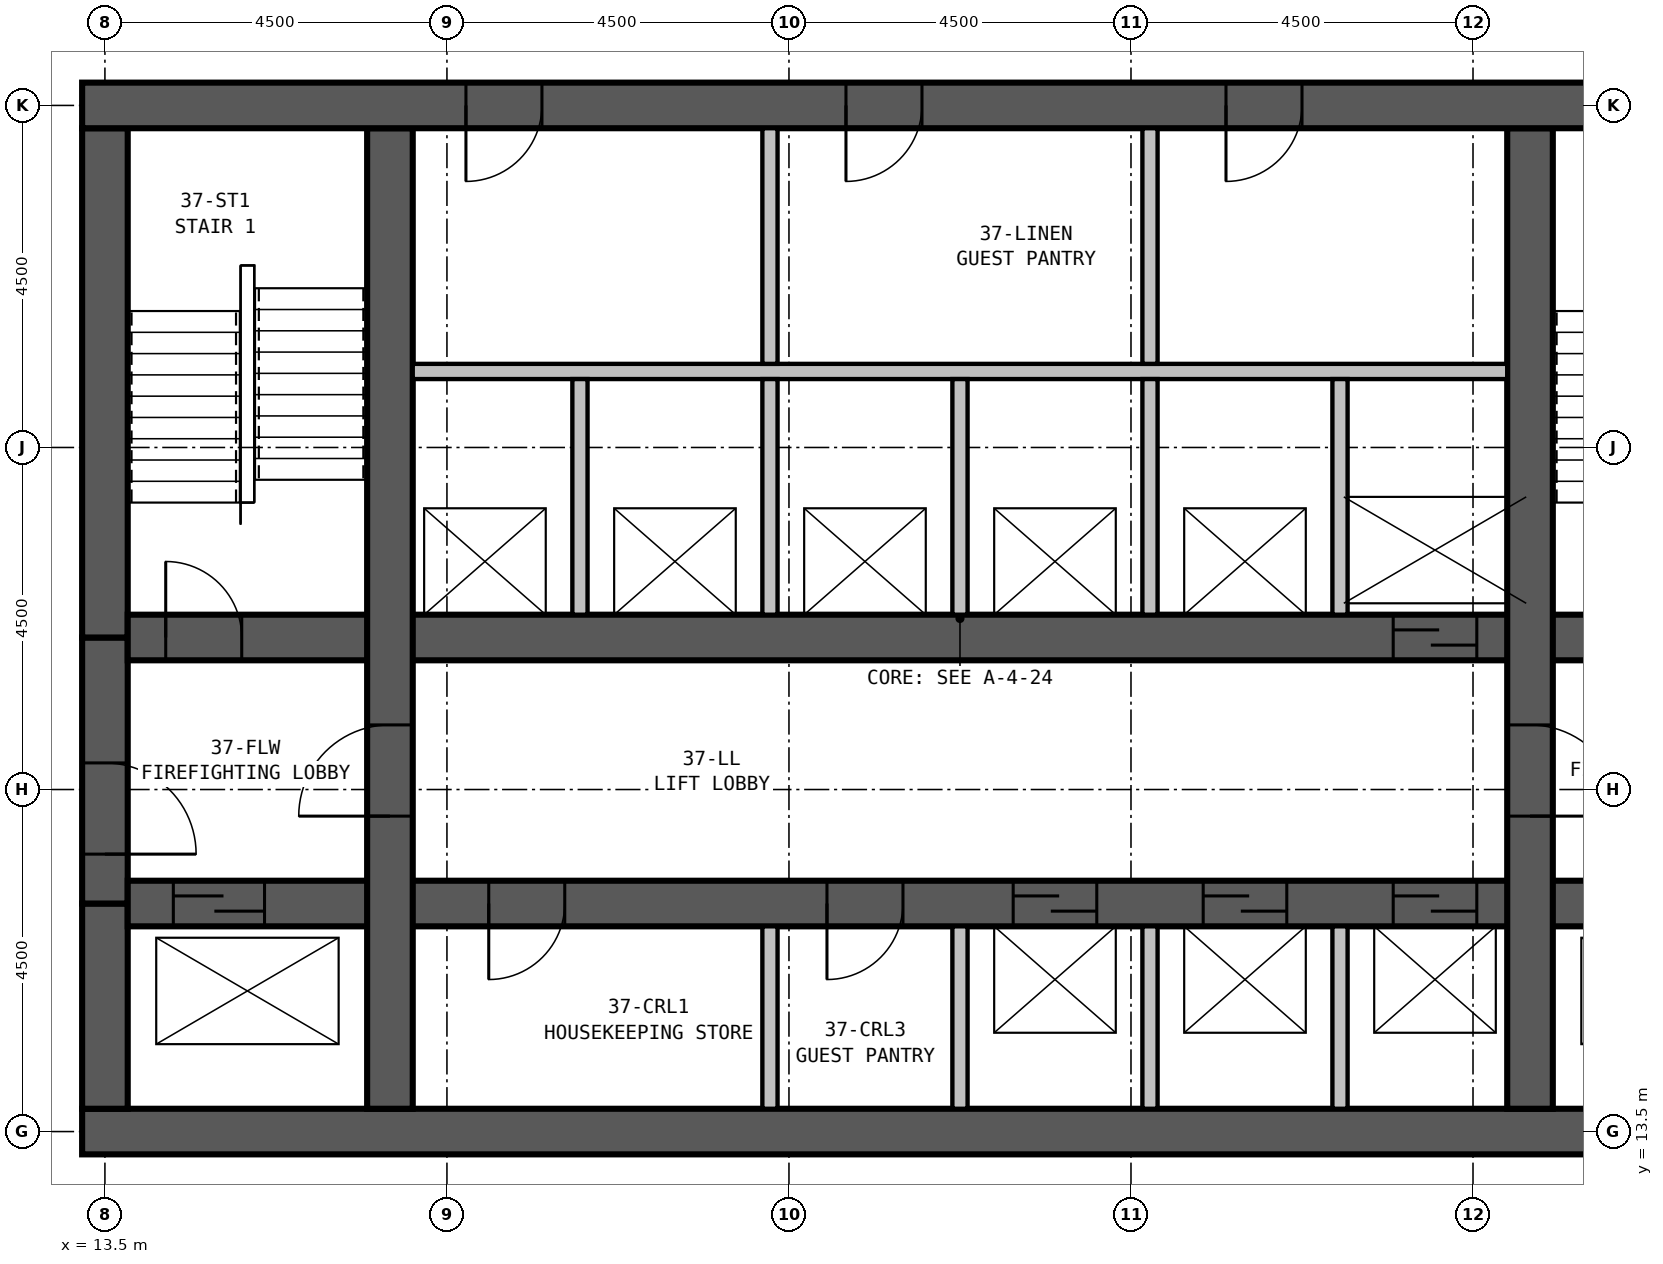
"""IFC4 building model, lengths in metres.
Left out: names, types, materials, properties, quantities, classifications, styles, units other than length and angle.
Written with IfcOpenShell. Run it as: python <this file> out.ifc"""

import sys

from ifc_helpers import new_model, si_unit, direction, frame, frame_2d, origin, place, context, subcontext, project, spatial, rectangle, extrude, element, fill, save


model = new_model("IFC4")
c1 = context("Model", 3, precision=1e-05, world=origin(), true_north=direction((0.0, 1.0)))
c2 = subcontext(c1, "Body", "Model", "MODEL_VIEW")
j1 = project(units=[si_unit("LENGTHUNIT", "METRE"), si_unit("PLANEANGLEUNIT", "RADIAN")], contexts=[c1])
p1 = place(None, origin())
s1 = spatial("IfcSite", under=j1, at=p1, CompositionType="ELEMENT")
p2 = place(p1, origin())
s2 = spatial("IfcBuilding", under=s1, at=p2, CompositionType="ELEMENT")
p3 = place(p2, frame((0.0, 0.0, 142.4)))
s3 = spatial("IfcBuildingStorey", under=s2, at=p3, CompositionType="ELEMENT", Elevation=142.4)
p4 = place(p3, frame((13.2, 13.5, 0.0), z_axis=(0.0, 0.0, 1.0), x_axis=(1.0, 0.0, 0.0)))
e1 = element("IfcWall", 1, at=p4, inside=s3, PredefinedType="SHEAR", context=c2, shape_type="SweptSolid", body=[
    extrude(rectangle(XDim=23.1, YDim=0.6, at=frame_2d((11.55, 0.0))), origin(), (0.0, 0.0, 1.0), 3.5),
])
p5 = place(p3, frame((36.3, 27.0, 0.0), z_axis=(0.0, 0.0, 1.0), x_axis=(-1.0, 0.0, 0.0)))
e2 = element("IfcWall", 2, at=p5, inside=s3, PredefinedType="SHEAR", context=c2, shape_type="SweptSolid", body=[
    extrude(rectangle(XDim=23.1, YDim=0.6, at=frame_2d((11.55, 0.0))), origin(), (0.0, 0.0, 1.0), 3.5),
])
p6 = place(p5, frame((17.05, 0.0, 0.0)))
e3 = element("IfcOpeningElement", 3, at=p6, cuts=e2, PredefinedType="OPENING", context=c2, shape_type="SweptSolid", body=[
    extrude(rectangle(XDim=1.0, YDim=2.1, at=frame_2d((0.5, 1.05))), frame((0.0, 0.31, 0.0), z_axis=(0.0, -1.0, 0.0), x_axis=(1.0, 0.0, 0.0)), (0.0, 0.0, 1.0), 0.62),
])
p7 = place(p5, frame((12.05, 0.0, 0.0)))
e4 = element("IfcOpeningElement", 4, at=p7, cuts=e2, PredefinedType="OPENING", context=c2, shape_type="SweptSolid", body=[
    extrude(rectangle(XDim=1.0, YDim=2.1, at=frame_2d((0.5, 1.05))), frame((0.0, 0.31, 0.0), z_axis=(0.0, -1.0, 0.0), x_axis=(1.0, 0.0, 0.0)), (0.0, 0.0, 1.0), 0.62),
])
p8 = place(p5, frame((7.05, 0.0, 0.0)))
e5 = element("IfcOpeningElement", 5, at=p8, cuts=e2, PredefinedType="OPENING", context=c2, shape_type="SweptSolid", body=[
    extrude(rectangle(XDim=1.0, YDim=2.1, at=frame_2d((0.5, 1.05))), frame((0.0, 0.31, 0.0), z_axis=(0.0, -1.0, 0.0), x_axis=(1.0, 0.0, 0.0)), (0.0, 0.0, 1.0), 0.62),
])
p9 = place(p3, frame((17.25, 13.8, 0.0), z_axis=(0.0, 0.0, 1.0), x_axis=(0.0, 1.0, 0.0)))
e6 = element("IfcWall", 6, at=p9, inside=s3, PredefinedType="SHEAR", context=c2, shape_type="SweptSolid", body=[
    extrude(rectangle(XDim=12.9, YDim=0.6, at=frame_2d((6.45, 0.0))), origin(), (0.0, 0.0, 1.0), 3.5),
])
p10 = place(p9, frame((3.85, 0.0, 0.0)))
e7 = element("IfcOpeningElement", 7, at=p10, cuts=e6, PredefinedType="OPENING", context=c2, shape_type="SweptSolid", body=[
    extrude(rectangle(XDim=1.2, YDim=2.1, at=frame_2d((0.6, 1.05))), frame((0.0, 0.31, 0.0), z_axis=(0.0, -1.0, 0.0), x_axis=(1.0, 0.0, 0.0)), (0.0, 0.0, 1.0), 0.62),
])
p11 = place(p3, frame((32.25, 13.8, 0.0), z_axis=(0.0, 0.0, 1.0), x_axis=(0.0, 1.0, 0.0)))
e8 = element("IfcWall", 8, at=p11, inside=s3, PredefinedType="SHEAR", context=c2, shape_type="SweptSolid", body=[
    extrude(rectangle(XDim=12.9, YDim=0.6, at=frame_2d((6.45, 0.0))), origin(), (0.0, 0.0, 1.0), 3.5),
])
p12 = place(p11, frame((5.05, 0.0, 0.0), z_axis=(0.0, 0.0, 1.0), x_axis=(-1.0, 0.0, 0.0)))
e9 = element("IfcOpeningElement", 9, at=p12, cuts=e8, PredefinedType="OPENING", context=c2, shape_type="SweptSolid", body=[
    extrude(rectangle(XDim=1.2, YDim=2.1, at=frame_2d((0.6, 1.05))), frame((0.0, 0.31, 0.0), z_axis=(0.0, -1.0, 0.0), x_axis=(1.0, 0.0, 0.0)), (0.0, 0.0, 1.0), 0.62),
])
p13 = place(p3, frame((13.8, 16.5, 0.0), z_axis=(0.0, 0.0, 1.0), x_axis=(1.0, 0.0, 0.0)))
e10 = element("IfcWall", 10, at=p13, inside=s3, PredefinedType="SHEAR", context=c2, shape_type="SweptSolid", body=[
    extrude(rectangle(XDim=21.9, YDim=0.6, at=frame_2d((10.95, 0.0))), origin(), (0.0, 0.0, 1.0), 3.5),
])
p14 = place(p13, frame((11.65, 0.0, 0.0)))
e11 = element("IfcOpeningElement", 11, at=p14, cuts=e10, PredefinedType="OPENING", context=c2, shape_type="SweptSolid", body=[
    extrude(rectangle(XDim=1.1, YDim=2.1, at=frame_2d((0.55, 1.05))), frame((0.0, 0.31, 0.0), z_axis=(0.0, -1.0, 0.0), x_axis=(1.0, 0.0, 0.0)), (0.0, 0.0, 1.0), 0.62),
])
p15 = place(p13, frame((14.15, 0.0, 0.0)))
e12 = element("IfcOpeningElement", 12, at=p15, cuts=e10, PredefinedType="OPENING", context=c2, shape_type="SweptSolid", body=[
    extrude(rectangle(XDim=1.1, YDim=2.1, at=frame_2d((0.55, 1.05))), frame((0.0, 0.31, 0.0), z_axis=(0.0, -1.0, 0.0), x_axis=(1.0, 0.0, 0.0)), (0.0, 0.0, 1.0), 0.62),
])
p16 = place(p13, frame((16.65, 0.0, 0.0)))
e13 = element("IfcOpeningElement", 13, at=p16, cuts=e10, PredefinedType="OPENING", context=c2, shape_type="SweptSolid", body=[
    extrude(rectangle(XDim=1.1, YDim=2.1, at=frame_2d((0.55, 1.05))), frame((0.0, 0.31, 0.0), z_axis=(0.0, -1.0, 0.0), x_axis=(1.0, 0.0, 0.0)), (0.0, 0.0, 1.0), 0.62),
])
p17 = place(p13, frame((5.75, 0.0, 0.0), z_axis=(0.0, 0.0, 1.0), x_axis=(-1.0, 0.0, 0.0)))
e14 = element("IfcOpeningElement", 14, at=p17, cuts=e10, PredefinedType="OPENING", context=c2, shape_type="SweptSolid", body=[
    extrude(rectangle(XDim=1.0, YDim=2.1, at=frame_2d((0.5, 1.05))), frame((0.0, 0.31, 0.0), z_axis=(0.0, -1.0, 0.0), x_axis=(1.0, 0.0, 0.0)), (0.0, 0.0, 1.0), 0.62),
])
p18 = place(p13, frame((10.2, 0.0, 0.0), z_axis=(0.0, 0.0, 1.0), x_axis=(-1.0, 0.0, 0.0)))
e15 = element("IfcOpeningElement", 15, at=p18, cuts=e10, PredefinedType="OPENING", context=c2, shape_type="SweptSolid", body=[
    extrude(rectangle(XDim=1.0, YDim=2.1, at=frame_2d((0.5, 1.05))), frame((0.0, 0.31, 0.0), z_axis=(0.0, -1.0, 0.0), x_axis=(1.0, 0.0, 0.0)), (0.0, 0.0, 1.0), 0.62),
])
p19 = place(p13, frame((0.6, 0.0, 0.0)))
e16 = element("IfcOpeningElement", 16, at=p19, cuts=e10, PredefinedType="OPENING", context=c2, shape_type="SweptSolid", body=[
    extrude(rectangle(XDim=1.2, YDim=2.1, at=frame_2d((0.6, 1.05))), frame((0.0, 0.31, 0.0), z_axis=(0.0, -1.0, 0.0), x_axis=(1.0, 0.0, 0.0)), (0.0, 0.0, 1.0), 0.62),
])
p20 = place(p13, frame((19.6, 0.0, 0.0)))
e17 = element("IfcOpeningElement", 17, at=p20, cuts=e10, PredefinedType="OPENING", context=c2, shape_type="SweptSolid", body=[
    extrude(rectangle(XDim=1.2, YDim=2.1, at=frame_2d((0.6, 1.05))), frame((0.0, 0.31, 0.0), z_axis=(0.0, -1.0, 0.0), x_axis=(1.0, 0.0, 0.0)), (0.0, 0.0, 1.0), 0.62),
])
p21 = place(p3, frame((13.8, 20.0, 0.0), z_axis=(0.0, 0.0, 1.0), x_axis=(1.0, 0.0, 0.0)))
e18 = element("IfcWall", 18, at=p21, inside=s3, PredefinedType="SHEAR", context=c2, shape_type="SweptSolid", body=[
    extrude(rectangle(XDim=21.9, YDim=0.6, at=frame_2d((10.95, 0.0))), origin(), (0.0, 0.0, 1.0), 3.5),
])
p22 = place(p21, frame((0.5, 0.0, 0.0)))
e19 = element("IfcOpeningElement", 19, at=p22, cuts=e18, PredefinedType="OPENING", context=c2, shape_type="SweptSolid", body=[
    extrude(rectangle(XDim=1.0, YDim=2.1, at=frame_2d((0.5, 1.05))), frame((0.0, 0.31, 0.0), z_axis=(0.0, -1.0, 0.0), x_axis=(1.0, 0.0, 0.0)), (0.0, 0.0, 1.0), 0.62),
])
p23 = place(p21, frame((20.5, 0.0, 0.0)))
e20 = element("IfcOpeningElement", 20, at=p23, cuts=e18, PredefinedType="OPENING", context=c2, shape_type="SweptSolid", body=[
    extrude(rectangle(XDim=1.0, YDim=2.1, at=frame_2d((0.5, 1.05))), frame((0.0, 0.31, 0.0), z_axis=(0.0, -1.0, 0.0), x_axis=(1.0, 0.0, 0.0)), (0.0, 0.0, 1.0), 0.62),
])
p24 = place(p21, frame((16.65, 0.0, 0.0)))
e21 = element("IfcOpeningElement", 21, at=p24, cuts=e18, PredefinedType="OPENING", context=c2, shape_type="SweptSolid", body=[
    extrude(rectangle(XDim=1.1, YDim=2.1, at=frame_2d((0.55, 1.05))), frame((0.0, 0.31, 0.0), z_axis=(0.0, -1.0, 0.0), x_axis=(1.0, 0.0, 0.0)), (0.0, 0.0, 1.0), 0.62),
])
p25 = place(p3, frame((13.5, 26.7, 0.0), z_axis=(0.0, 0.0, 1.0), x_axis=(0.0, -1.0, 0.0)))
e22 = element("IfcWall", 22, at=p25, inside=s3, PredefinedType="SHEAR", context=c2, shape_type="SweptSolid", body=[
    extrude(rectangle(XDim=6.7, YDim=0.6, at=frame_2d((3.35, 0.0))), origin(), (0.0, 0.0, 1.0), 3.5),
])
p26 = place(p3, frame((13.5, 20.0, 0.0), z_axis=(0.0, 0.0, 1.0), x_axis=(0.0, -1.0, 0.0)))
e23 = element("IfcWall", 23, at=p26, inside=s3, PredefinedType="SHEAR", context=c2, shape_type="SweptSolid", body=[
    extrude(rectangle(XDim=3.5, YDim=0.6, at=frame_2d((1.75, 0.0))), origin(), (0.0, 0.0, 1.0), 3.5),
])
p27 = place(p26, frame((1.65, 0.0, 0.0)))
e24 = element("IfcOpeningElement", 24, at=p27, cuts=e23, PredefinedType="OPENING", context=c2, shape_type="SweptSolid", body=[
    extrude(rectangle(XDim=1.2, YDim=2.1, at=frame_2d((0.6, 1.05))), frame((0.0, 0.31, 0.0), z_axis=(0.0, -1.0, 0.0), x_axis=(1.0, 0.0, 0.0)), (0.0, 0.0, 1.0), 0.62),
])
p28 = place(p3, frame((13.5, 16.5, 0.0), z_axis=(0.0, 0.0, 1.0), x_axis=(0.0, -1.0, 0.0)))
e25 = element("IfcWall", 25, at=p28, inside=s3, PredefinedType="SHEAR", context=c2, shape_type="SweptSolid", body=[
    extrude(rectangle(XDim=2.7, YDim=0.6, at=frame_2d((1.35, 0.0))), origin(), (0.0, 0.0, 1.0), 3.5),
])
p29 = place(p3, frame((19.75, 20.3, 0.0), z_axis=(0.0, 0.0, 1.0), x_axis=(0.0, 1.0, 0.0)))
e26 = element("IfcWall", 26, at=p29, inside=s3, PredefinedType="PARTITIONING", context=c2, shape_type="SweptSolid", body=[
    extrude(rectangle(XDim=3.1, YDim=0.2, at=frame_2d((1.55, 0.0))), origin(), (0.0, 0.0, 1.0), 3.25),
])
p30 = place(p3, frame((22.25, 13.8, 0.0), z_axis=(0.0, 0.0, 1.0), x_axis=(0.0, 1.0, 0.0)))
e27 = element("IfcWall", 27, at=p30, inside=s3, PredefinedType="PARTITIONING", context=c2, shape_type="SweptSolid", body=[
    extrude(rectangle(XDim=2.4, YDim=0.2, at=frame_2d((1.2, 0.0))), origin(), (0.0, 0.0, 1.0), 3.25),
])
p31 = place(p3, frame((22.25, 20.3, 0.0), z_axis=(0.0, 0.0, 1.0), x_axis=(0.0, 1.0, 0.0)))
e28 = element("IfcWall", 28, at=p31, inside=s3, PredefinedType="PARTITIONING", context=c2, shape_type="SweptSolid", body=[
    extrude(rectangle(XDim=3.1, YDim=0.2, at=frame_2d((1.55, 0.0))), origin(), (0.0, 0.0, 1.0), 3.25),
])
p32 = place(p3, frame((24.75, 13.8, 0.0), z_axis=(0.0, 0.0, 1.0), x_axis=(0.0, 1.0, 0.0)))
e29 = element("IfcWall", 29, at=p32, inside=s3, PredefinedType="PARTITIONING", context=c2, shape_type="SweptSolid", body=[
    extrude(rectangle(XDim=2.4, YDim=0.2, at=frame_2d((1.2, 0.0))), origin(), (0.0, 0.0, 1.0), 3.25),
])
p33 = place(p3, frame((24.75, 20.3, 0.0), z_axis=(0.0, 0.0, 1.0), x_axis=(0.0, 1.0, 0.0)))
e30 = element("IfcWall", 30, at=p33, inside=s3, PredefinedType="PARTITIONING", context=c2, shape_type="SweptSolid", body=[
    extrude(rectangle(XDim=3.1, YDim=0.2, at=frame_2d((1.55, 0.0))), origin(), (0.0, 0.0, 1.0), 3.25),
])
p34 = place(p3, frame((27.25, 13.8, 0.0), z_axis=(0.0, 0.0, 1.0), x_axis=(0.0, 1.0, 0.0)))
e31 = element("IfcWall", 31, at=p34, inside=s3, PredefinedType="PARTITIONING", context=c2, shape_type="SweptSolid", body=[
    extrude(rectangle(XDim=2.4, YDim=0.2, at=frame_2d((1.2, 0.0))), origin(), (0.0, 0.0, 1.0), 3.25),
])
p35 = place(p3, frame((27.25, 20.3, 0.0), z_axis=(0.0, 0.0, 1.0), x_axis=(0.0, 1.0, 0.0)))
e32 = element("IfcWall", 32, at=p35, inside=s3, PredefinedType="PARTITIONING", context=c2, shape_type="SweptSolid", body=[
    extrude(rectangle(XDim=3.1, YDim=0.2, at=frame_2d((1.55, 0.0))), origin(), (0.0, 0.0, 1.0), 3.25),
])
p36 = place(p3, frame((29.75, 13.8, 0.0), z_axis=(0.0, 0.0, 1.0), x_axis=(0.0, 1.0, 0.0)))
e33 = element("IfcWall", 33, at=p36, inside=s3, PredefinedType="PARTITIONING", context=c2, shape_type="SweptSolid", body=[
    extrude(rectangle(XDim=2.4, YDim=0.2, at=frame_2d((1.2, 0.0))), origin(), (0.0, 0.0, 1.0), 3.25),
])
p37 = place(p3, frame((29.75, 20.3, 0.0), z_axis=(0.0, 0.0, 1.0), x_axis=(0.0, 1.0, 0.0)))
e34 = element("IfcWall", 34, at=p37, inside=s3, PredefinedType="PARTITIONING", context=c2, shape_type="SweptSolid", body=[
    extrude(rectangle(XDim=3.1, YDim=0.2, at=frame_2d((1.55, 0.0))), origin(), (0.0, 0.0, 1.0), 3.25),
])
p38 = place(p3, frame((17.55, 23.5, 0.0), z_axis=(0.0, 0.0, 1.0), x_axis=(1.0, 0.0, 0.0)))
e35 = element("IfcWall", 35, at=p38, inside=s3, PredefinedType="PARTITIONING", context=c2, shape_type="SweptSolid", body=[
    extrude(rectangle(XDim=14.4, YDim=0.2, at=frame_2d((7.2, 0.0))), origin(), (0.0, 0.0, 1.0), 3.25),
])
for number, where, z_axis, x_axis in (
    (36, (22.25, 23.6, 0.0), (0.0, 0.0, 1.0), (0.0, 1.0, 0.0)),
    (37, (27.25, 23.6, 0.0), (0.0, 0.0, 1.0), (0.0, 1.0, 0.0)),
):
    element("IfcWall", number, at=place(p3, frame(where, z_axis=z_axis, x_axis=x_axis)), inside=s3, PredefinedType="PARTITIONING", context=c2, shape_type="SweptSolid", body=[
        extrude(rectangle(XDim=3.1, YDim=0.2, at=frame_2d((1.55, 0.0))), origin(), (0.0, 0.0, 1.0), 3.25),
    ])
p39 = place(p27, origin())
e38 = element("IfcDoor", 38, at=p39, inside=s3, OperationType="SINGLE_SWING_RIGHT", PredefinedType="DOOR", context=c2, shape_type="SweptSolid", body=[
    extrude(rectangle(XDim=1.2, YDim=2.1, at=frame_2d((0.6, 1.05))), frame((0.0, 0.3, 0.0), z_axis=(0.0, -1.0, 0.0), x_axis=(1.0, 0.0, 0.0)), (0.0, 0.0, 1.0), 0.6),
])
fill(e24, e38)
p40 = place(p10, origin())
e39 = element("IfcDoor", 39, at=p40, inside=s3, OperationType="SINGLE_SWING_LEFT", PredefinedType="DOOR", context=c2, shape_type="SweptSolid", body=[
    extrude(rectangle(XDim=1.2, YDim=2.1, at=frame_2d((0.6, 1.05))), frame((0.0, 0.3, 0.0), z_axis=(0.0, -1.0, 0.0), x_axis=(1.0, 0.0, 0.0)), (0.0, 0.0, 1.0), 0.6),
])
fill(e7, e39)
p41 = place(p12, origin())
e40 = element("IfcDoor", 40, at=p41, inside=s3, OperationType="SINGLE_SWING_RIGHT", PredefinedType="DOOR", context=c2, shape_type="SweptSolid", body=[
    extrude(rectangle(XDim=1.2, YDim=2.1, at=frame_2d((0.6, 1.05))), frame((0.0, 0.3, 0.0), z_axis=(0.0, -1.0, 0.0), x_axis=(1.0, 0.0, 0.0)), (0.0, 0.0, 1.0), 0.6),
])
fill(e9, e40)
p42 = place(p22, origin())
e41 = element("IfcDoor", 41, at=p42, inside=s3, OperationType="SINGLE_SWING_LEFT", PredefinedType="DOOR", context=c2, shape_type="SweptSolid", body=[
    extrude(rectangle(XDim=1.0, YDim=2.1, at=frame_2d((0.5, 1.05))), frame((0.0, 0.3, 0.0), z_axis=(0.0, -1.0, 0.0), x_axis=(1.0, 0.0, 0.0)), (0.0, 0.0, 1.0), 0.6),
])
fill(e19, e41)
p43 = place(p14, origin())
e42 = element("IfcDoor", 42, at=p43, inside=s3, OperationType="SLIDING_TO_LEFT", PredefinedType="DOOR", context=c2, shape_type="SweptSolid", body=[
    extrude(rectangle(XDim=1.1, YDim=2.1, at=frame_2d((0.55, 1.05))), frame((0.0, 0.3, 0.0), z_axis=(0.0, -1.0, 0.0), x_axis=(1.0, 0.0, 0.0)), (0.0, 0.0, 1.0), 0.6),
])
fill(e11, e42)
p44 = place(p15, origin())
e43 = element("IfcDoor", 43, at=p44, inside=s3, OperationType="SLIDING_TO_LEFT", PredefinedType="DOOR", context=c2, shape_type="SweptSolid", body=[
    extrude(rectangle(XDim=1.1, YDim=2.1, at=frame_2d((0.55, 1.05))), frame((0.0, 0.3, 0.0), z_axis=(0.0, -1.0, 0.0), x_axis=(1.0, 0.0, 0.0)), (0.0, 0.0, 1.0), 0.6),
])
fill(e12, e43)
p45 = place(p16, origin())
e44 = element("IfcDoor", 44, at=p45, inside=s3, OperationType="SLIDING_TO_LEFT", PredefinedType="DOOR", context=c2, shape_type="SweptSolid", body=[
    extrude(rectangle(XDim=1.1, YDim=2.1, at=frame_2d((0.55, 1.05))), frame((0.0, 0.3, 0.0), z_axis=(0.0, -1.0, 0.0), x_axis=(1.0, 0.0, 0.0)), (0.0, 0.0, 1.0), 0.6),
])
fill(e13, e44)
p46 = place(p24, origin())
e45 = element("IfcDoor", 45, at=p46, inside=s3, OperationType="SLIDING_TO_LEFT", PredefinedType="DOOR", context=c2, shape_type="SweptSolid", body=[
    extrude(rectangle(XDim=1.1, YDim=2.1, at=frame_2d((0.55, 1.05))), frame((0.0, 0.3, 0.0), z_axis=(0.0, -1.0, 0.0), x_axis=(1.0, 0.0, 0.0)), (0.0, 0.0, 1.0), 0.6),
])
fill(e21, e45)
p47 = place(p17, origin())
e46 = element("IfcDoor", 46, at=p47, inside=s3, OperationType="SINGLE_SWING_RIGHT", PredefinedType="DOOR", context=c2, shape_type="SweptSolid", body=[
    extrude(rectangle(XDim=1.0, YDim=2.1, at=frame_2d((0.5, 1.05))), frame((0.0, 0.3, 0.0), z_axis=(0.0, -1.0, 0.0), x_axis=(1.0, 0.0, 0.0)), (0.0, 0.0, 1.0), 0.6),
])
fill(e14, e46)
p48 = place(p18, origin())
e47 = element("IfcDoor", 47, at=p48, inside=s3, OperationType="SINGLE_SWING_RIGHT", PredefinedType="DOOR", context=c2, shape_type="SweptSolid", body=[
    extrude(rectangle(XDim=1.0, YDim=2.1, at=frame_2d((0.5, 1.05))), frame((0.0, 0.3, 0.0), z_axis=(0.0, -1.0, 0.0), x_axis=(1.0, 0.0, 0.0)), (0.0, 0.0, 1.0), 0.6),
])
fill(e15, e47)
p49 = place(p19, origin())
e48 = element("IfcDoor", 48, at=p49, inside=s3, OperationType="SLIDING_TO_LEFT", PredefinedType="DOOR", context=c2, shape_type="SweptSolid", body=[
    extrude(rectangle(XDim=1.2, YDim=2.1, at=frame_2d((0.6, 1.05))), frame((0.0, 0.3, 0.0), z_axis=(0.0, -1.0, 0.0), x_axis=(1.0, 0.0, 0.0)), (0.0, 0.0, 1.0), 0.6),
])
fill(e16, e48)
p50 = place(p6, origin())
e49 = element("IfcDoor", 49, at=p50, inside=s3, OperationType="SINGLE_SWING_RIGHT", PredefinedType="DOOR", context=c2, shape_type="SweptSolid", body=[
    extrude(rectangle(XDim=1.0, YDim=2.1, at=frame_2d((0.5, 1.05))), frame((0.0, 0.3, 0.0), z_axis=(0.0, -1.0, 0.0), x_axis=(1.0, 0.0, 0.0)), (0.0, 0.0, 1.0), 0.6),
])
fill(e3, e49)
p51 = place(p7, origin())
e50 = element("IfcDoor", 50, at=p51, inside=s3, OperationType="SINGLE_SWING_RIGHT", PredefinedType="DOOR", context=c2, shape_type="SweptSolid", body=[
    extrude(rectangle(XDim=1.0, YDim=2.1, at=frame_2d((0.5, 1.05))), frame((0.0, 0.3, 0.0), z_axis=(0.0, -1.0, 0.0), x_axis=(1.0, 0.0, 0.0)), (0.0, 0.0, 1.0), 0.6),
])
fill(e4, e50)
p52 = place(p8, origin())
e51 = element("IfcDoor", 51, at=p52, inside=s3, OperationType="SINGLE_SWING_RIGHT", PredefinedType="DOOR", context=c2, shape_type="SweptSolid", body=[
    extrude(rectangle(XDim=1.0, YDim=2.1, at=frame_2d((0.5, 1.05))), frame((0.0, 0.3, 0.0), z_axis=(0.0, -1.0, 0.0), x_axis=(1.0, 0.0, 0.0)), (0.0, 0.0, 1.0), 0.6),
])
fill(e5, e51)
save(model, sys.argv[1])
